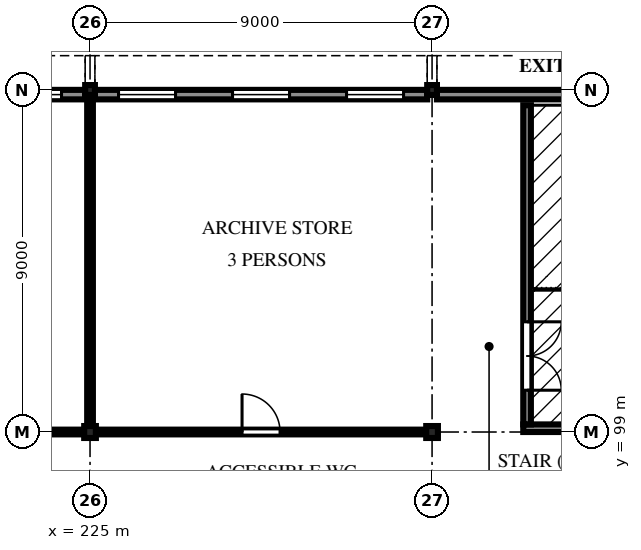
"""IFC4 building model, lengths in metres.
Left out: names, types, materials, properties, quantities, classifications, styles, units other than length and angle.
Written with IfcOpenShell. Run it as: python <this file> out.ifc"""

import sys

from ifc_helpers import new_model, si_unit, direction, frame, frame_2d, origin, origin_2d, place, context, subcontext, project, spatial, polyline, rectangle, i_section, outline, extrude, element, fill, save


model = new_model("IFC4")
c1 = context("Model", 3, precision=1e-05, world=origin(), true_north=direction((0.0, 1.0)))
c2 = subcontext(c1, "Body", "Model", "MODEL_VIEW")
j1 = project(units=[si_unit("LENGTHUNIT", "METRE"), si_unit("PLANEANGLEUNIT", "RADIAN")], contexts=[c1])
p1 = place(None, origin())
s1 = spatial("IfcSite", under=j1, at=p1, CompositionType="ELEMENT")
p2 = place(p1, origin())
s2 = spatial("IfcBuilding", under=s1, at=p2, CompositionType="ELEMENT")
p3 = place(p2, frame((0.0, 0.0, 7.5)))
s3 = spatial("IfcBuildingStorey", under=s2, at=p3, CompositionType="ELEMENT", Elevation=7.5)
p4 = place(p3, frame((225.0, 99.0, 0.0), z_axis=(0.0, 0.0, 1.0), x_axis=(1.0, 0.0, 0.0)))
e1 = element("IfcColumn", 1, at=p4, inside=s3, PredefinedType="COLUMN", context=c2, shape_type="SweptSolid", body=[
    extrude(i_section(OverallWidth=0.307, OverallDepth=0.314, WebThickness=0.012, FlangeThickness=0.019, FilletRadius=0.015, at=origin_2d()), origin(), (0.0, 0.0, 1.0), 4.2),
])
p5 = place(p3, frame((225.0, 108.0, 0.0), z_axis=(0.0, 0.0, 1.0), x_axis=(1.0, 0.0, 0.0)))
e2 = element("IfcColumn", 2, at=p5, inside=s3, PredefinedType="COLUMN", context=c2, shape_type="SweptSolid", body=[
    extrude(i_section(OverallWidth=0.256, OverallDepth=0.26, WebThickness=0.01, FlangeThickness=0.017, FilletRadius=0.013, at=origin_2d()), origin(), (0.0, 0.0, 1.0), 4.2),
])
p6 = place(p3, frame((234.0, 99.0, 0.0), z_axis=(0.0, 0.0, 1.0), x_axis=(1.0, 0.0, 0.0)))
e3 = element("IfcColumn", 3, at=p6, inside=s3, PredefinedType="COLUMN", context=c2, shape_type="SweptSolid", body=[
    extrude(i_section(OverallWidth=0.307, OverallDepth=0.314, WebThickness=0.012, FlangeThickness=0.019, FilletRadius=0.015, at=origin_2d()), origin(), (0.0, 0.0, 1.0), 4.2),
])
p7 = place(p3, frame((234.0, 108.0, 0.0), z_axis=(0.0, 0.0, 1.0), x_axis=(1.0, 0.0, 0.0)))
e4 = element("IfcColumn", 4, at=p7, inside=s3, PredefinedType="COLUMN", context=c2, shape_type="SweptSolid", body=[
    extrude(i_section(OverallWidth=0.256, OverallDepth=0.26, WebThickness=0.01, FlangeThickness=0.017, FilletRadius=0.013, at=origin_2d()), origin(), (0.0, 0.0, 1.0), 4.2),
])
p8 = place(p3, frame((216.128, 107.878, 0.0), z_axis=(0.0, 0.0, 1.0), x_axis=(1.0, 0.0, 0.0)))
e5 = element("IfcWall", 5, at=p8, inside=s3, PredefinedType="SOLIDWALL", context=c2, shape_type="SweptSolid", body=[
    extrude(rectangle(XDim=8.744, YDim=0.25, at=frame_2d((4.372, 0.0))), origin(), (0.0, 0.0, 1.0), 4.05),
])
p9 = place(p8, frame((0.622, 0.0, 0.9)))
e6 = element("IfcOpeningElement", 6, at=p9, cuts=e5, PredefinedType="OPENING", context=c2, shape_type="SweptSolid", body=[
    extrude(rectangle(XDim=1.5, YDim=2.4, at=frame_2d((0.75, 1.2))), frame((0.0, 0.135, 0.0), z_axis=(0.0, -1.0, 0.0), x_axis=(1.0, 0.0, 0.0)), (0.0, 0.0, 1.0), 0.27),
])
p10 = place(p8, frame((3.622, 0.0, 0.9)))
e7 = element("IfcOpeningElement", 7, at=p10, cuts=e5, PredefinedType="OPENING", context=c2, shape_type="SweptSolid", body=[
    extrude(rectangle(XDim=1.5, YDim=2.4, at=frame_2d((0.75, 1.2))), frame((0.0, 0.135, 0.0), z_axis=(0.0, -1.0, 0.0), x_axis=(1.0, 0.0, 0.0)), (0.0, 0.0, 1.0), 0.27),
])
p11 = place(p8, frame((6.622, 0.0, 0.9)))
e8 = element("IfcOpeningElement", 8, at=p11, cuts=e5, PredefinedType="OPENING", context=c2, shape_type="SweptSolid", body=[
    extrude(rectangle(XDim=1.5, YDim=2.4, at=frame_2d((0.75, 1.2))), frame((0.0, 0.135, 0.0), z_axis=(0.0, -1.0, 0.0), x_axis=(1.0, 0.0, 0.0)), (0.0, 0.0, 1.0), 0.27),
])
p12 = place(p3, frame((225.128, 107.878, 0.0), z_axis=(0.0, 0.0, 1.0), x_axis=(1.0, 0.0, 0.0)))
e9 = element("IfcWall", 9, at=p12, inside=s3, PredefinedType="SOLIDWALL", context=c2, shape_type="SweptSolid", body=[
    extrude(rectangle(XDim=8.744, YDim=0.25, at=frame_2d((4.372, 0.0))), origin(), (0.0, 0.0, 1.0), 4.05),
])
p13 = place(p12, frame((0.622, 0.0, 0.9)))
e10 = element("IfcOpeningElement", 10, at=p13, cuts=e9, PredefinedType="OPENING", context=c2, shape_type="SweptSolid", body=[
    extrude(rectangle(XDim=1.5, YDim=2.4, at=frame_2d((0.75, 1.2))), frame((0.0, 0.135, 0.0), z_axis=(0.0, -1.0, 0.0), x_axis=(1.0, 0.0, 0.0)), (0.0, 0.0, 1.0), 0.27),
])
p14 = place(p12, frame((3.622, 0.0, 0.9)))
e11 = element("IfcOpeningElement", 11, at=p14, cuts=e9, PredefinedType="OPENING", context=c2, shape_type="SweptSolid", body=[
    extrude(rectangle(XDim=1.5, YDim=2.4, at=frame_2d((0.75, 1.2))), frame((0.0, 0.135, 0.0), z_axis=(0.0, -1.0, 0.0), x_axis=(1.0, 0.0, 0.0)), (0.0, 0.0, 1.0), 0.27),
])
p15 = place(p12, frame((6.622, 0.0, 0.9)))
e12 = element("IfcOpeningElement", 12, at=p15, cuts=e9, PredefinedType="OPENING", context=c2, shape_type="SweptSolid", body=[
    extrude(rectangle(XDim=1.5, YDim=2.4, at=frame_2d((0.75, 1.2))), frame((0.0, 0.135, 0.0), z_axis=(0.0, -1.0, 0.0), x_axis=(1.0, 0.0, 0.0)), (0.0, 0.0, 1.0), 0.27),
])
p16 = place(p3, frame((234.128, 107.878, 0.0), z_axis=(0.0, 0.0, 1.0), x_axis=(1.0, 0.0, 0.0)))
e13 = element("IfcWall", 13, at=p16, inside=s3, PredefinedType="SOLIDWALL", context=c2, shape_type="SweptSolid", body=[
    extrude(rectangle(XDim=8.744, YDim=0.25, at=frame_2d((4.372, 0.0))), origin(), (0.0, 0.0, 1.0), 4.05),
])
p17 = place(p16, frame((3.922, 0.0, 1.2)))
e14 = element("IfcOpeningElement", 14, at=p17, cuts=e13, PredefinedType="OPENING", context=c2, shape_type="SweptSolid", body=[
    extrude(rectangle(XDim=0.9, YDim=1.8, at=frame_2d((0.45, 0.9))), frame((0.0, 0.135, 0.0), z_axis=(0.0, -1.0, 0.0), x_axis=(1.0, 0.0, 0.0)), (0.0, 0.0, 1.0), 0.27),
])
p18 = place(p3, frame((236.4, 99.1, -0.13), z_axis=(0.0, 0.0, 1.0), x_axis=(1.0, 0.0, 0.0)))
e15 = element("IfcWall", 15, at=p18, inside=s3, PredefinedType="SOLIDWALL", context=c2, shape_type="SweptSolid", body=[
    extrude(rectangle(XDim=4.2, YDim=0.2, at=frame_2d((2.1, 0.0))), origin(), (0.0, 0.0, 1.0), 3.72),
])
p19 = place(p18, frame((1.2, 0.0, 0.13)))
e16 = element("IfcOpeningElement", 16, at=p19, cuts=e15, PredefinedType="OPENING", context=c2, shape_type="SweptSolid", body=[
    extrude(rectangle(XDim=1.8, YDim=2.1, at=frame_2d((0.9, 1.05))), frame((0.0, 0.11, 0.0), z_axis=(0.0, -1.0, 0.0), x_axis=(1.0, 0.0, 0.0)), (0.0, 0.0, 1.0), 0.22),
])
p20 = place(p3, frame((236.5, 99.2, -0.13), z_axis=(0.0, 0.0, 1.0), x_axis=(0.0, 1.0, 0.0)))
e17 = element("IfcWall", 17, at=p20, inside=s3, PredefinedType="SOLIDWALL", context=c2, shape_type="SweptSolid", body=[
    extrude(rectangle(XDim=8.4, YDim=0.2, at=frame_2d((4.2, 0.0))), origin(), (0.0, 0.0, 1.0), 3.72),
])
p21 = place(p20, frame((0.9, 0.0, 0.13)))
e18 = element("IfcOpeningElement", 18, at=p21, cuts=e17, PredefinedType="OPENING", context=c2, shape_type="SweptSolid", body=[
    extrude(rectangle(XDim=1.8, YDim=2.1, at=frame_2d((0.9, 1.05))), frame((0.0, 0.11, 0.0), z_axis=(0.0, -1.0, 0.0), x_axis=(1.0, 0.0, 0.0)), (0.0, 0.0, 1.0), 0.22),
])
p22 = place(p3, frame((216.154, 99.0, 0.0), z_axis=(0.0, 0.0, 1.0), x_axis=(1.0, 0.0, 0.0)))
e19 = element("IfcWall", 19, at=p22, inside=s3, PredefinedType="PARTITIONING", context=c2, shape_type="SweptSolid", body=[
    extrude(rectangle(XDim=8.692, YDim=0.125, at=frame_2d((4.346, 0.0))), origin(), (0.0, 0.0, 1.0), 3.307),
])
p23 = place(p3, frame((225.154, 99.0, 0.0), z_axis=(0.0, 0.0, 1.0), x_axis=(1.0, 0.0, 0.0)))
e20 = element("IfcWall", 20, at=p23, inside=s3, PredefinedType="PARTITIONING", context=c2, shape_type="SweptSolid", body=[
    extrude(rectangle(XDim=8.692, YDim=0.125, at=frame_2d((4.346, 0.0))), origin(), (0.0, 0.0, 1.0), 3.307),
])
p24 = place(p23, frame((3.846, 0.0, 0.0)))
e21 = element("IfcOpeningElement", 21, at=p24, cuts=e20, PredefinedType="OPENING", context=c2, shape_type="SweptSolid", body=[
    extrude(rectangle(XDim=1.0, YDim=2.1, at=frame_2d((0.5, 1.05))), frame((0.0, 0.073, 0.0), z_axis=(0.0, -1.0, 0.0), x_axis=(1.0, 0.0, 0.0)), (0.0, 0.0, 1.0), 0.145),
])
p25 = place(p3, frame((225.0, 107.87, 0.0), z_axis=(0.0, 0.0, 1.0), x_axis=(0.0, -1.0, 0.0)))
e22 = element("IfcWall", 22, at=p25, inside=s3, PredefinedType="PARTITIONING", context=c2, shape_type="SweptSolid", body=[
    extrude(rectangle(XDim=8.713, YDim=0.15, at=frame_2d((4.356, 0.0))), origin(), (0.0, 0.0, 1.0), 3.307),
])
p26 = place(p11, origin())
e23 = element("IfcWindow", 23, at=p26, inside=s3, PartitioningType="DOUBLE_PANEL_VERTICAL", PredefinedType="WINDOW", context=c2, shape_type="SweptSolid", body=[
    extrude(outline(polyline([(0.0, 0.0), (1.5, 0.0), (1.5, 2.4), (0.0, 2.4), (0.0, 0.0)]), holes=[polyline([(0.07, 0.07), (1.43, 0.07), (1.43, 2.33), (0.07, 2.33), (0.07, 0.07)])]), frame((0.0, 0.03, 0.0), z_axis=(0.0, -1.0, 0.0), x_axis=(1.0, 0.0, 0.0)), (0.0, 0.0, 1.0), 0.06),
    extrude(rectangle(XDim=0.04, YDim=2.26, at=frame_2d((0.75, 1.2))), frame((0.0, 0.022, 0.0), z_axis=(0.0, -1.0, 0.0), x_axis=(1.0, 0.0, 0.0)), (0.0, 0.0, 1.0), 0.044),
    extrude(outline(polyline([(0.07, 0.07), (0.73, 0.07), (0.73, 2.33), (0.07, 2.33), (0.07, 0.07)]), holes=[polyline([(0.1, 0.1), (0.7, 0.1), (0.7, 2.3), (0.1, 2.3), (0.1, 0.1)])]), frame((0.0, 0.022, 0.0), z_axis=(0.0, -1.0, 0.0), x_axis=(1.0, 0.0, 0.0)), (0.0, 0.0, 1.0), 0.045),
    extrude(rectangle(XDim=0.6, YDim=2.2, at=frame_2d((0.4, 1.2))), frame((0.0, 0.006, 0.0), z_axis=(0.0, -1.0, 0.0), x_axis=(1.0, 0.0, 0.0)), (0.0, 0.0, 1.0), 0.012),
    extrude(outline(polyline([(0.77, 0.07), (1.43, 0.07), (1.43, 2.33), (0.77, 2.33), (0.77, 0.07)]), holes=[polyline([(0.8, 0.1), (1.4, 0.1), (1.4, 2.3), (0.8, 2.3), (0.8, 0.1)])]), frame((0.0, 0.022, 0.0), z_axis=(0.0, -1.0, 0.0), x_axis=(1.0, 0.0, 0.0)), (0.0, 0.0, 1.0), 0.045),
    extrude(rectangle(XDim=0.6, YDim=2.2, at=frame_2d((1.1, 1.2))), frame((0.0, 0.006, 0.0), z_axis=(0.0, -1.0, 0.0), x_axis=(1.0, 0.0, 0.0)), (0.0, 0.0, 1.0), 0.012),
])
fill(e8, e23)
p27 = place(p13, origin())
e24 = element("IfcWindow", 24, at=p27, inside=s3, PartitioningType="DOUBLE_PANEL_VERTICAL", PredefinedType="WINDOW", context=c2, shape_type="SweptSolid", body=[
    extrude(outline(polyline([(0.0, 0.0), (1.5, 0.0), (1.5, 2.4), (0.0, 2.4), (0.0, 0.0)]), holes=[polyline([(0.07, 0.07), (1.43, 0.07), (1.43, 2.33), (0.07, 2.33), (0.07, 0.07)])]), frame((0.0, 0.03, 0.0), z_axis=(0.0, -1.0, 0.0), x_axis=(1.0, 0.0, 0.0)), (0.0, 0.0, 1.0), 0.06),
    extrude(rectangle(XDim=0.04, YDim=2.26, at=frame_2d((0.75, 1.2))), frame((0.0, 0.022, 0.0), z_axis=(0.0, -1.0, 0.0), x_axis=(1.0, 0.0, 0.0)), (0.0, 0.0, 1.0), 0.044),
    extrude(outline(polyline([(0.07, 0.07), (0.73, 0.07), (0.73, 2.33), (0.07, 2.33), (0.07, 0.07)]), holes=[polyline([(0.1, 0.1), (0.7, 0.1), (0.7, 2.3), (0.1, 2.3), (0.1, 0.1)])]), frame((0.0, 0.022, 0.0), z_axis=(0.0, -1.0, 0.0), x_axis=(1.0, 0.0, 0.0)), (0.0, 0.0, 1.0), 0.045),
    extrude(rectangle(XDim=0.6, YDim=2.2, at=frame_2d((0.4, 1.2))), frame((0.0, 0.006, 0.0), z_axis=(0.0, -1.0, 0.0), x_axis=(1.0, 0.0, 0.0)), (0.0, 0.0, 1.0), 0.012),
    extrude(outline(polyline([(0.77, 0.07), (1.43, 0.07), (1.43, 2.33), (0.77, 2.33), (0.77, 0.07)]), holes=[polyline([(0.8, 0.1), (1.4, 0.1), (1.4, 2.3), (0.8, 2.3), (0.8, 0.1)])]), frame((0.0, 0.022, 0.0), z_axis=(0.0, -1.0, 0.0), x_axis=(1.0, 0.0, 0.0)), (0.0, 0.0, 1.0), 0.045),
    extrude(rectangle(XDim=0.6, YDim=2.2, at=frame_2d((1.1, 1.2))), frame((0.0, 0.006, 0.0), z_axis=(0.0, -1.0, 0.0), x_axis=(1.0, 0.0, 0.0)), (0.0, 0.0, 1.0), 0.012),
])
fill(e10, e24)
p28 = place(p14, origin())
e25 = element("IfcWindow", 25, at=p28, inside=s3, PartitioningType="DOUBLE_PANEL_VERTICAL", PredefinedType="WINDOW", context=c2, shape_type="SweptSolid", body=[
    extrude(outline(polyline([(0.0, 0.0), (1.5, 0.0), (1.5, 2.4), (0.0, 2.4), (0.0, 0.0)]), holes=[polyline([(0.07, 0.07), (1.43, 0.07), (1.43, 2.33), (0.07, 2.33), (0.07, 0.07)])]), frame((0.0, 0.03, 0.0), z_axis=(0.0, -1.0, 0.0), x_axis=(1.0, 0.0, 0.0)), (0.0, 0.0, 1.0), 0.06),
    extrude(rectangle(XDim=0.04, YDim=2.26, at=frame_2d((0.75, 1.2))), frame((0.0, 0.022, 0.0), z_axis=(0.0, -1.0, 0.0), x_axis=(1.0, 0.0, 0.0)), (0.0, 0.0, 1.0), 0.044),
    extrude(outline(polyline([(0.07, 0.07), (0.73, 0.07), (0.73, 2.33), (0.07, 2.33), (0.07, 0.07)]), holes=[polyline([(0.1, 0.1), (0.7, 0.1), (0.7, 2.3), (0.1, 2.3), (0.1, 0.1)])]), frame((0.0, 0.022, 0.0), z_axis=(0.0, -1.0, 0.0), x_axis=(1.0, 0.0, 0.0)), (0.0, 0.0, 1.0), 0.045),
    extrude(rectangle(XDim=0.6, YDim=2.2, at=frame_2d((0.4, 1.2))), frame((0.0, 0.006, 0.0), z_axis=(0.0, -1.0, 0.0), x_axis=(1.0, 0.0, 0.0)), (0.0, 0.0, 1.0), 0.012),
    extrude(outline(polyline([(0.77, 0.07), (1.43, 0.07), (1.43, 2.33), (0.77, 2.33), (0.77, 0.07)]), holes=[polyline([(0.8, 0.1), (1.4, 0.1), (1.4, 2.3), (0.8, 2.3), (0.8, 0.1)])]), frame((0.0, 0.022, 0.0), z_axis=(0.0, -1.0, 0.0), x_axis=(1.0, 0.0, 0.0)), (0.0, 0.0, 1.0), 0.045),
    extrude(rectangle(XDim=0.6, YDim=2.2, at=frame_2d((1.1, 1.2))), frame((0.0, 0.006, 0.0), z_axis=(0.0, -1.0, 0.0), x_axis=(1.0, 0.0, 0.0)), (0.0, 0.0, 1.0), 0.012),
])
fill(e11, e25)
p29 = place(p15, origin())
e26 = element("IfcWindow", 26, at=p29, inside=s3, PartitioningType="DOUBLE_PANEL_VERTICAL", PredefinedType="WINDOW", context=c2, shape_type="SweptSolid", body=[
    extrude(outline(polyline([(0.0, 0.0), (1.5, 0.0), (1.5, 2.4), (0.0, 2.4), (0.0, 0.0)]), holes=[polyline([(0.07, 0.07), (1.43, 0.07), (1.43, 2.33), (0.07, 2.33), (0.07, 0.07)])]), frame((0.0, 0.03, 0.0), z_axis=(0.0, -1.0, 0.0), x_axis=(1.0, 0.0, 0.0)), (0.0, 0.0, 1.0), 0.06),
    extrude(rectangle(XDim=0.04, YDim=2.26, at=frame_2d((0.75, 1.2))), frame((0.0, 0.022, 0.0), z_axis=(0.0, -1.0, 0.0), x_axis=(1.0, 0.0, 0.0)), (0.0, 0.0, 1.0), 0.044),
    extrude(outline(polyline([(0.07, 0.07), (0.73, 0.07), (0.73, 2.33), (0.07, 2.33), (0.07, 0.07)]), holes=[polyline([(0.1, 0.1), (0.7, 0.1), (0.7, 2.3), (0.1, 2.3), (0.1, 0.1)])]), frame((0.0, 0.022, 0.0), z_axis=(0.0, -1.0, 0.0), x_axis=(1.0, 0.0, 0.0)), (0.0, 0.0, 1.0), 0.045),
    extrude(rectangle(XDim=0.6, YDim=2.2, at=frame_2d((0.4, 1.2))), frame((0.0, 0.006, 0.0), z_axis=(0.0, -1.0, 0.0), x_axis=(1.0, 0.0, 0.0)), (0.0, 0.0, 1.0), 0.012),
    extrude(outline(polyline([(0.77, 0.07), (1.43, 0.07), (1.43, 2.33), (0.77, 2.33), (0.77, 0.07)]), holes=[polyline([(0.8, 0.1), (1.4, 0.1), (1.4, 2.3), (0.8, 2.3), (0.8, 0.1)])]), frame((0.0, 0.022, 0.0), z_axis=(0.0, -1.0, 0.0), x_axis=(1.0, 0.0, 0.0)), (0.0, 0.0, 1.0), 0.045),
    extrude(rectangle(XDim=0.6, YDim=2.2, at=frame_2d((1.1, 1.2))), frame((0.0, 0.006, 0.0), z_axis=(0.0, -1.0, 0.0), x_axis=(1.0, 0.0, 0.0)), (0.0, 0.0, 1.0), 0.012),
])
fill(e12, e26)
p30 = place(p24, origin())
e27 = element("IfcDoor", 27, at=p30, inside=s3, OperationType="SINGLE_SWING_LEFT", PredefinedType="DOOR", context=c2, shape_type="SweptSolid", body=[
    extrude(outline(polyline([(0.0, 0.0), (0.07, 0.0), (0.07, 2.03), (0.93, 2.03), (0.93, 0.0), (1.0, 0.0), (1.0, 2.1), (0.0, 2.1), (0.0, 0.0)])), frame((0.0, 0.025, 0.0), z_axis=(0.0, -1.0, 0.0), x_axis=(1.0, 0.0, 0.0)), (0.0, 0.0, 1.0), 0.05),
    extrude(outline(polyline([(0.074, 0.01), (0.926, 0.01), (0.926, 2.026), (0.074, 2.026), (0.074, 0.01)]), holes=[polyline([(0.194, 0.16), (0.806, 0.16), (0.806, 1.01), (0.194, 1.01), (0.194, 0.16)]), polyline([(0.35, 1.16), (0.65, 1.16), (0.65, 1.76), (0.35, 1.76), (0.35, 1.16)])]), frame((0.0, 0.017, 0.0), z_axis=(0.0, -1.0, 0.0), x_axis=(1.0, 0.0, 0.0)), (0.0, 0.0, 1.0), 0.035),
    extrude(rectangle(XDim=0.612, YDim=0.85, at=frame_2d((0.5, 0.585))), frame((0.0, 0.009, 0.0), z_axis=(0.0, -1.0, 0.0), x_axis=(1.0, 0.0, 0.0)), (0.0, 0.0, 1.0), 0.017),
    extrude(rectangle(XDim=0.3, YDim=0.6, at=frame_2d((0.5, 1.46))), frame((0.0, 0.006, 0.0), z_axis=(0.0, -1.0, 0.0), x_axis=(1.0, 0.0, 0.0)), (0.0, 0.0, 1.0), 0.012),
])
fill(e21, e27)
p31 = place(p21, frame((1.8, 0.0, 0.0), z_axis=(0.0, 0.0, 1.0), x_axis=(-1.0, 0.0, 0.0)))
e28 = element("IfcDoor", 28, at=p31, inside=s3, OperationType="DOUBLE_DOOR_SINGLE_SWING", PredefinedType="DOOR", context=c2, shape_type="SweptSolid", body=[
    extrude(outline(polyline([(0.0, 0.0), (0.07, 0.0), (0.07, 2.03), (1.73, 2.03), (1.73, 0.0), (1.8, 0.0), (1.8, 2.1), (0.0, 2.1), (0.0, 0.0)])), frame((0.0, 0.025, 0.0), z_axis=(0.0, -1.0, 0.0), x_axis=(1.0, 0.0, 0.0)), (0.0, 0.0, 1.0), 0.05),
    extrude(outline(polyline([(0.074, 0.01), (0.897, 0.01), (0.897, 2.026), (0.074, 2.026), (0.074, 0.01)]), holes=[polyline([(0.194, 0.16), (0.777, 0.16), (0.777, 1.01), (0.194, 1.01), (0.194, 0.16)]), polyline([(0.335, 1.16), (0.635, 1.16), (0.635, 1.76), (0.335, 1.76), (0.335, 1.16)])]), frame((0.0, 0.017, 0.0), z_axis=(0.0, -1.0, 0.0), x_axis=(1.0, 0.0, 0.0)), (0.0, 0.0, 1.0), 0.035),
    extrude(rectangle(XDim=0.583, YDim=0.85, at=frame_2d((0.485, 0.585))), frame((0.0, 0.009, 0.0), z_axis=(0.0, -1.0, 0.0), x_axis=(1.0, 0.0, 0.0)), (0.0, 0.0, 1.0), 0.017),
    extrude(rectangle(XDim=0.3, YDim=0.6, at=frame_2d((0.485, 1.46))), frame((0.0, 0.006, 0.0), z_axis=(0.0, -1.0, 0.0), x_axis=(1.0, 0.0, 0.0)), (0.0, 0.0, 1.0), 0.012),
    extrude(outline(polyline([(0.903, 0.01), (1.726, 0.01), (1.726, 2.026), (0.903, 2.026), (0.903, 0.01)]), holes=[polyline([(1.023, 0.16), (1.606, 0.16), (1.606, 1.01), (1.023, 1.01), (1.023, 0.16)]), polyline([(1.165, 1.16), (1.465, 1.16), (1.465, 1.76), (1.165, 1.76), (1.165, 1.16)])]), frame((0.0, 0.017, 0.0), z_axis=(0.0, -1.0, 0.0), x_axis=(1.0, 0.0, 0.0)), (0.0, 0.0, 1.0), 0.035),
    extrude(rectangle(XDim=0.583, YDim=0.85, at=frame_2d((1.314, 0.585))), frame((0.0, 0.009, 0.0), z_axis=(0.0, -1.0, 0.0), x_axis=(1.0, 0.0, 0.0)), (0.0, 0.0, 1.0), 0.017),
    extrude(rectangle(XDim=0.3, YDim=0.6, at=frame_2d((1.314, 1.46))), frame((0.0, 0.006, 0.0), z_axis=(0.0, -1.0, 0.0), x_axis=(1.0, 0.0, 0.0)), (0.0, 0.0, 1.0), 0.012),
])
fill(e18, e28)
save(model, sys.argv[1])
